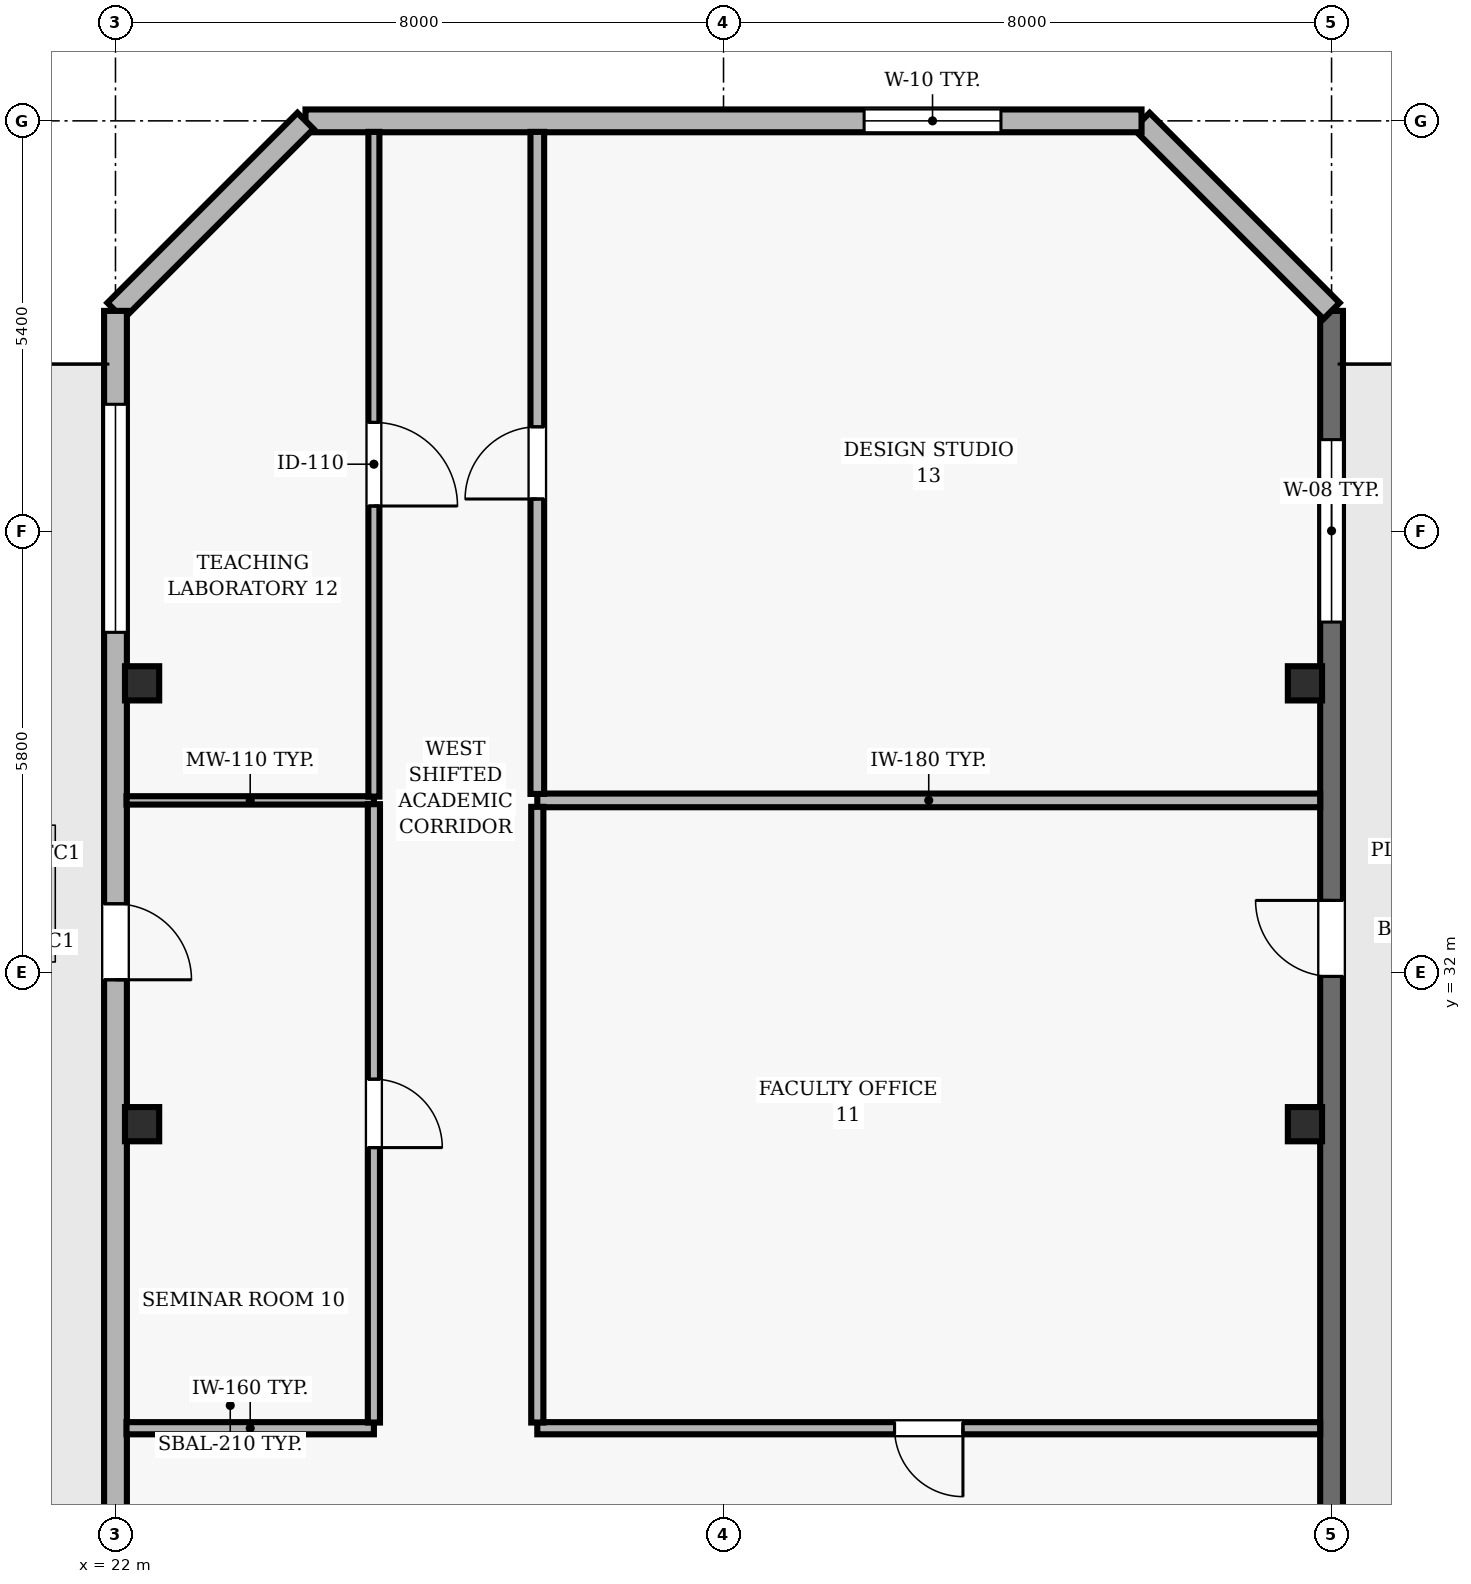
"""IFC4 building model, lengths in metres.
Left out: names, types, materials, properties, quantities, classifications, styles, units other than length and angle.
Written with IfcOpenShell. Run it as: python <this file> out.ifc"""

import sys

from ifc_helpers import new_model, si_unit, direction, frame, frame_2d, origin, origin_2d, place, context, subcontext, project, spatial, rectangle, hollow_rectangle, extrude, element, fill, save


model = new_model("IFC4")
c1 = context("Model", 3, precision=1e-05, world=origin(), true_north=direction((0.0, 1.0)))
c2 = subcontext(c1, "Body", "Model", "MODEL_VIEW")
j1 = project(units=[si_unit("LENGTHUNIT", "METRE"), si_unit("PLANEANGLEUNIT", "RADIAN")], contexts=[c1])
p1 = place(None, origin())
s1 = spatial("IfcSite", under=j1, at=p1, CompositionType="ELEMENT")
p2 = place(p1, origin())
s2 = spatial("IfcBuilding", under=s1, at=p2, CompositionType="ELEMENT")
p3 = place(p2, frame((0.0, 0.0, 195.3)))
s3 = spatial("IfcBuildingStorey", under=s2, at=p3, CompositionType="ELEMENT", Elevation=195.3)
for number, where, z_axis, x_axis in (
    (1, (22.35, 30.0, 0.0), (0.0, 0.0, 1.0), (1.0, 0.0, 0.0)),
    (2, (37.65, 30.0, 0.0), (0.0, 0.0, 1.0), (1.0, 0.0, 0.0)),
    (3, (22.35, 35.8, 0.0), (0.0, 0.0, 1.0), (1.0, 0.0, 0.0)),
    (4, (37.65, 35.8, 0.0), (0.0, 0.0, 1.0), (1.0, 0.0, 0.0)),
):
    element("IfcColumn", number, at=place(p3, frame(where, z_axis=z_axis, x_axis=x_axis)), inside=s3, PredefinedType="COLUMN", context=c2, shape_type="SweptSolid", body=[
        extrude(hollow_rectangle(XDim=0.45, YDim=0.45, WallThickness=0.02, at=origin_2d()), origin(), (0.0, 0.0, 1.0), 3.9),
    ])
p4 = place(p3, frame((38.0, 23.335, 0.0), z_axis=(0.0, 0.0, 1.0), x_axis=(0.0, 1.0, 0.0)))
e5 = element("IfcWall", 5, at=p4, inside=s3, PredefinedType="SOLIDWALL", context=c2, shape_type="SweptSolid", body=[
    extrude(rectangle(XDim=17.365, YDim=0.3, at=frame_2d((8.683, 0.0))), origin(), (0.0, 0.0, 1.0), 3.69),
])
p5 = place(p4, frame((8.609, 0.0, 0.0)))
e6 = element("IfcOpeningElement", 6, at=p5, cuts=e5, PredefinedType="OPENING", context=c2, shape_type="SweptSolid", body=[
    extrude(rectangle(XDim=1.0, YDim=2.2, at=frame_2d((0.5, 1.1))), frame((0.0, 0.16, 0.0), z_axis=(0.0, -1.0, 0.0), x_axis=(1.0, 0.0, 0.0)), (0.0, 0.0, 1.0), 0.32),
])
p6 = place(p4, frame((13.271, 0.0, 0.9)))
e7 = element("IfcOpeningElement", 7, at=p6, cuts=e5, PredefinedType="OPENING", context=c2, shape_type="SweptSolid", body=[
    extrude(rectangle(XDim=2.4, YDim=1.8, at=frame_2d((1.2, 0.9))), frame((0.0, 0.16, 0.0), z_axis=(0.0, -1.0, 0.0), x_axis=(1.0, 0.0, 0.0)), (0.0, 0.0, 1.0), 0.32),
])
p7 = place(p3, frame((38.0, 40.7, 0.0), z_axis=(0.0, 0.0, 1.0), x_axis=(-0.707106781187, 0.707106781187, 0.0)))
e8 = element("IfcWall", 8, at=p7, inside=s3, PredefinedType="SOLIDWALL", context=c2, shape_type="SweptSolid", body=[
    extrude(rectangle(XDim=3.536, YDim=0.3, at=frame_2d((1.768, 0.0))), origin(), (0.0, 0.0, 1.0), 3.69),
])
p8 = place(p3, frame((35.5, 43.2, 0.0), z_axis=(0.0, 0.0, 1.0), x_axis=(-1.0, 0.0, 0.0)))
e9 = element("IfcWall", 9, at=p8, inside=s3, PredefinedType="SOLIDWALL", context=c2, shape_type="SweptSolid", body=[
    extrude(rectangle(XDim=11.0, YDim=0.3, at=frame_2d((5.5, 0.0))), origin(), (0.0, 0.0, 1.0), 3.69),
])
p9 = place(p8, frame((1.85, 0.0, 0.9)))
e10 = element("IfcOpeningElement", 10, at=p9, cuts=e9, PredefinedType="OPENING", context=c2, shape_type="SweptSolid", body=[
    extrude(rectangle(XDim=1.8, YDim=2.2, at=frame_2d((0.9, 1.1))), frame((0.0, 0.16, 0.0), z_axis=(0.0, -1.0, 0.0), x_axis=(1.0, 0.0, 0.0)), (0.0, 0.0, 1.0), 0.32),
])
p10 = place(p3, frame((24.5, 43.2, 0.0), z_axis=(0.0, 0.0, 1.0), x_axis=(-0.707106781187, -0.707106781187, 0.0)))
e11 = element("IfcWall", 11, at=p10, inside=s3, PredefinedType="SOLIDWALL", context=c2, shape_type="SweptSolid", body=[
    extrude(rectangle(XDim=3.536, YDim=0.3, at=frame_2d((1.768, 0.0))), origin(), (0.0, 0.0, 1.0), 3.69),
])
p11 = place(p3, frame((22.0, 40.7, 0.0), z_axis=(0.0, 0.0, 1.0), x_axis=(0.0, -1.0, 0.0)))
e12 = element("IfcWall", 12, at=p11, inside=s3, PredefinedType="SOLIDWALL", context=c2, shape_type="SweptSolid", body=[
    extrude(rectangle(XDim=38.2, YDim=0.3, at=frame_2d((19.1, 0.0))), origin(), (0.0, 0.0, 1.0), 3.69),
])
p12 = place(p11, frame((7.8, 0.0, 0.0)))
e13 = element("IfcOpeningElement", 13, at=p12, cuts=e12, PredefinedType="OPENING", context=c2, shape_type="SweptSolid", body=[
    extrude(rectangle(XDim=1.0, YDim=2.2, at=frame_2d((0.5, 1.1))), frame((0.0, 0.16, 0.0), z_axis=(0.0, -1.0, 0.0), x_axis=(1.0, 0.0, 0.0)), (0.0, 0.0, 1.0), 0.32),
])
p13 = place(p11, frame((1.229, 0.0, 0.9)))
e14 = element("IfcOpeningElement", 14, at=p13, cuts=e12, PredefinedType="OPENING", context=c2, shape_type="SweptSolid", body=[
    extrude(rectangle(XDim=3.0, YDim=2.2, at=frame_2d((1.5, 1.1))), frame((0.0, 0.16, 0.0), z_axis=(0.0, -1.0, 0.0), x_axis=(1.0, 0.0, 0.0)), (0.0, 0.0, 1.0), 0.32),
])
p14 = place(p11, frame((18.05, 0.0, 0.9)))
e15 = element("IfcOpeningElement", 15, at=p14, cuts=e12, PredefinedType="OPENING", context=c2, shape_type="SweptSolid", body=[
    extrude(rectangle(XDim=3.0, YDim=2.2, at=frame_2d((1.5, 1.1))), frame((0.0, 0.16, 0.0), z_axis=(0.0, -1.0, 0.0), x_axis=(1.0, 0.0, 0.0)), (0.0, 0.0, 1.0), 0.32),
])
p15 = place(p11, frame((28.514, 0.0, 0.9)))
e16 = element("IfcOpeningElement", 16, at=p15, cuts=e12, PredefinedType="OPENING", context=c2, shape_type="SweptSolid", body=[
    extrude(rectangle(XDim=3.0, YDim=2.2, at=frame_2d((1.5, 1.1))), frame((0.0, 0.16, 0.0), z_axis=(0.0, -1.0, 0.0), x_axis=(1.0, 0.0, 0.0)), (0.0, 0.0, 1.0), 0.32),
])
p16 = place(p3, frame((25.4, 26.0, 0.0), z_axis=(0.0, 0.0, 1.0), x_axis=(-1.0, 0.0, 0.0)))
e17 = element("IfcWall", 17, at=p16, inside=s3, PredefinedType="PARTITIONING", context=c2, shape_type="SweptSolid", body=[
    extrude(rectangle(XDim=3.255, YDim=0.16, at=frame_2d((1.627, 0.0))), origin(), (0.0, 0.0, 1.0), 3.69),
])
p17 = place(p3, frame((25.4, 34.26, 0.0), z_axis=(0.0, 0.0, 1.0), x_axis=(-1.0, 0.0, 0.0)))
e18 = element("IfcWall", 18, at=p17, inside=s3, PredefinedType="MOVABLE", context=c2, shape_type="SweptSolid", body=[
    extrude(rectangle(XDim=3.255, YDim=0.11, at=frame_2d((1.627, 0.0))), origin(), (0.0, 0.0, 1.0), 3.69),
])
p18 = place(p3, frame((37.85, 26.0, 0.0), z_axis=(0.0, 0.0, 1.0), x_axis=(-1.0, 0.0, 0.0)))
e19 = element("IfcWall", 19, at=p18, inside=s3, PredefinedType="PARTITIONING", context=c2, shape_type="SweptSolid", body=[
    extrude(rectangle(XDim=10.3, YDim=0.16, at=frame_2d((5.15, 0.0))), origin(), (0.0, 0.0, 1.0), 3.69),
])
p19 = place(p18, frame((4.7, 0.0, 0.0)))
e20 = element("IfcOpeningElement", 20, at=p19, cuts=e19, PredefinedType="OPENING", context=c2, shape_type="SweptSolid", body=[
    extrude(rectangle(XDim=0.9, YDim=2.1, at=frame_2d((0.45, 1.05))), frame((0.0, 0.09, 0.0), z_axis=(0.0, -1.0, 0.0), x_axis=(1.0, 0.0, 0.0)), (0.0, 0.0, 1.0), 0.18),
])
p20 = place(p3, frame((37.85, 34.26, 0.0), z_axis=(0.0, 0.0, 1.0), x_axis=(-1.0, 0.0, 0.0)))
e21 = element("IfcWall", 21, at=p20, inside=s3, PredefinedType="PARTITIONING", context=c2, shape_type="SweptSolid", body=[
    extrude(rectangle(XDim=10.3, YDim=0.18, at=frame_2d((5.15, 0.0))), origin(), (0.0, 0.0, 1.0), 3.69),
])
p21 = place(p3, frame((25.4, 34.21, 0.0), z_axis=(0.0, 0.0, 1.0), x_axis=(0.0, -1.0, 0.0)))
e22 = element("IfcWall", 22, at=p21, inside=s3, PredefinedType="PARTITIONING", context=c2, shape_type="SweptSolid", body=[
    extrude(rectangle(XDim=8.135, YDim=0.16, at=frame_2d((4.067, 0.0))), origin(), (0.0, 0.0, 1.0), 3.69),
])
p22 = place(p21, frame((3.618, 0.0, 0.0)))
e23 = element("IfcOpeningElement", 23, at=p22, cuts=e22, PredefinedType="OPENING", context=c2, shape_type="SweptSolid", body=[
    extrude(rectangle(XDim=0.9, YDim=2.1, at=frame_2d((0.45, 1.05))), frame((0.0, 0.09, 0.0), z_axis=(0.0, -1.0, 0.0), x_axis=(1.0, 0.0, 0.0)), (0.0, 0.0, 1.0), 0.18),
])
p23 = place(p3, frame((25.4, 43.055, 0.0), z_axis=(0.0, 0.0, 1.0), x_axis=(0.0, -1.0, 0.0)))
e24 = element("IfcWall", 24, at=p23, inside=s3, PredefinedType="PARTITIONING", context=c2, shape_type="SweptSolid", body=[
    extrude(rectangle(XDim=8.745, YDim=0.145, at=frame_2d((4.373, 0.0))), origin(), (0.0, 0.0, 1.0), 3.69),
])
p24 = place(p23, frame((3.822, 0.0, 0.0)))
e25 = element("IfcOpeningElement", 25, at=p24, cuts=e24, PredefinedType="OPENING", context=c2, shape_type="SweptSolid", body=[
    extrude(rectangle(XDim=1.1, YDim=2.15, at=frame_2d((0.55, 1.075))), frame((0.0, 0.083, 0.0), z_axis=(0.0, -1.0, 0.0), x_axis=(1.0, 0.0, 0.0)), (0.0, 0.0, 1.0), 0.165),
])
p25 = place(p3, frame((27.55, 26.075, 0.0), z_axis=(0.0, 0.0, 1.0), x_axis=(0.0, 1.0, 0.0)))
e26 = element("IfcWall", 26, at=p25, inside=s3, PredefinedType="PARTITIONING", context=c2, shape_type="SweptSolid", body=[
    extrude(rectangle(XDim=8.1, YDim=0.16, at=frame_2d((4.05, 0.0))), origin(), (0.0, 0.0, 1.0), 3.69),
])
p26 = place(p3, frame((27.55, 34.345, 0.0), z_axis=(0.0, 0.0, 1.0), x_axis=(0.0, 1.0, 0.0)))
e27 = element("IfcWall", 27, at=p26, inside=s3, PredefinedType="PARTITIONING", context=c2, shape_type="SweptSolid", body=[
    extrude(rectangle(XDim=8.71, YDim=0.18, at=frame_2d((4.355, 0.0))), origin(), (0.0, 0.0, 1.0), 3.69),
])
p27 = place(p26, frame((3.88, 0.0, 0.0)))
e28 = element("IfcOpeningElement", 28, at=p27, cuts=e27, PredefinedType="OPENING", context=c2, shape_type="SweptSolid", body=[
    extrude(rectangle(XDim=0.95, YDim=2.1, at=frame_2d((0.475, 1.05))), frame((0.0, 0.1, 0.0), z_axis=(0.0, -1.0, 0.0), x_axis=(1.0, 0.0, 0.0)), (0.0, 0.0, 1.0), 0.2),
])
p28 = place(p5, origin())
e29 = element("IfcDoor", 29, at=p28, inside=s3, OperationType="SINGLE_SWING_RIGHT", PredefinedType="DOOR", context=c2, shape_type="SweptSolid", body=[
    extrude(rectangle(XDim=1.0, YDim=2.2, at=frame_2d((0.5, 1.1))), frame((0.0, 0.025, 0.0), z_axis=(0.0, -1.0, 0.0), x_axis=(1.0, 0.0, 0.0)), (0.0, 0.0, 1.0), 0.05),
])
fill(e6, e29)
p29 = place(p6, origin())
e30 = element("IfcWindow", 30, at=p29, inside=s3, PartitioningType="SINGLE_PANEL", PredefinedType="WINDOW", context=c2, shape_type="SweptSolid", body=[
    extrude(rectangle(XDim=2.4, YDim=1.8, at=frame_2d((1.2, 0.9))), frame((0.0, 0.03, 0.0), z_axis=(0.0, -1.0, 0.0), x_axis=(1.0, 0.0, 0.0)), (0.0, 0.0, 1.0), 0.06),
])
fill(e7, e30)
p30 = place(p9, origin())
e31 = element("IfcWindow", 31, at=p30, inside=s3, PartitioningType="SINGLE_PANEL", PredefinedType="WINDOW", context=c2, shape_type="SweptSolid", body=[
    extrude(rectangle(XDim=1.8, YDim=2.2, at=frame_2d((0.9, 1.1))), frame((0.0, 0.03, 0.0), z_axis=(0.0, -1.0, 0.0), x_axis=(1.0, 0.0, 0.0)), (0.0, 0.0, 1.0), 0.06),
])
fill(e10, e31)
p31 = place(p12, origin())
e32 = element("IfcDoor", 32, at=p31, inside=s3, OperationType="SINGLE_SWING_RIGHT", PredefinedType="DOOR", context=c2, shape_type="SweptSolid", body=[
    extrude(rectangle(XDim=1.0, YDim=2.2, at=frame_2d((0.5, 1.1))), frame((0.0, 0.025, 0.0), z_axis=(0.0, -1.0, 0.0), x_axis=(1.0, 0.0, 0.0)), (0.0, 0.0, 1.0), 0.05),
])
fill(e13, e32)
p32 = place(p13, origin())
e33 = element("IfcWindow", 33, at=p32, inside=s3, PartitioningType="SINGLE_PANEL", PredefinedType="WINDOW", context=c2, shape_type="SweptSolid", body=[
    extrude(rectangle(XDim=3.0, YDim=2.2, at=frame_2d((1.5, 1.1))), frame((0.0, 0.03, 0.0), z_axis=(0.0, -1.0, 0.0), x_axis=(1.0, 0.0, 0.0)), (0.0, 0.0, 1.0), 0.06),
])
fill(e14, e33)
p33 = place(p22, origin())
e34 = element("IfcDoor", 34, at=p33, inside=s3, OperationType="SINGLE_SWING_RIGHT", PredefinedType="DOOR", context=c2, shape_type="SweptSolid", body=[
    extrude(rectangle(XDim=0.9, YDim=2.1, at=frame_2d((0.45, 1.05))), frame((0.0, 0.025, 0.0), z_axis=(0.0, -1.0, 0.0), x_axis=(1.0, 0.0, 0.0)), (0.0, 0.0, 1.0), 0.05),
])
fill(e23, e34)
p34 = place(p19, origin())
e35 = element("IfcDoor", 35, at=p34, inside=s3, OperationType="SINGLE_SWING_LEFT", PredefinedType="DOOR", context=c2, shape_type="SweptSolid", body=[
    extrude(rectangle(XDim=0.9, YDim=2.1, at=frame_2d((0.45, 1.05))), frame((0.0, 0.025, 0.0), z_axis=(0.0, -1.0, 0.0), x_axis=(1.0, 0.0, 0.0)), (0.0, 0.0, 1.0), 0.05),
])
fill(e20, e35)
p35 = place(p24, origin())
e36 = element("IfcDoor", 36, at=p35, inside=s3, OperationType="SINGLE_SWING_RIGHT", PredefinedType="DOOR", context=c2, shape_type="SweptSolid", body=[
    extrude(rectangle(XDim=1.1, YDim=2.15, at=frame_2d((0.55, 1.075))), frame((0.0, 0.025, 0.0), z_axis=(0.0, -1.0, 0.0), x_axis=(1.0, 0.0, 0.0)), (0.0, 0.0, 1.0), 0.05),
])
fill(e25, e36)
p36 = place(p27, origin())
e37 = element("IfcDoor", 37, at=p36, inside=s3, OperationType="SINGLE_SWING_LEFT", PredefinedType="DOOR", context=c2, shape_type="SweptSolid", body=[
    extrude(rectangle(XDim=0.95, YDim=2.1, at=frame_2d((0.475, 1.05))), frame((0.0, 0.025, 0.0), z_axis=(0.0, -1.0, 0.0), x_axis=(1.0, 0.0, 0.0)), (0.0, 0.0, 1.0), 0.05),
])
fill(e28, e37)
save(model, sys.argv[1])
